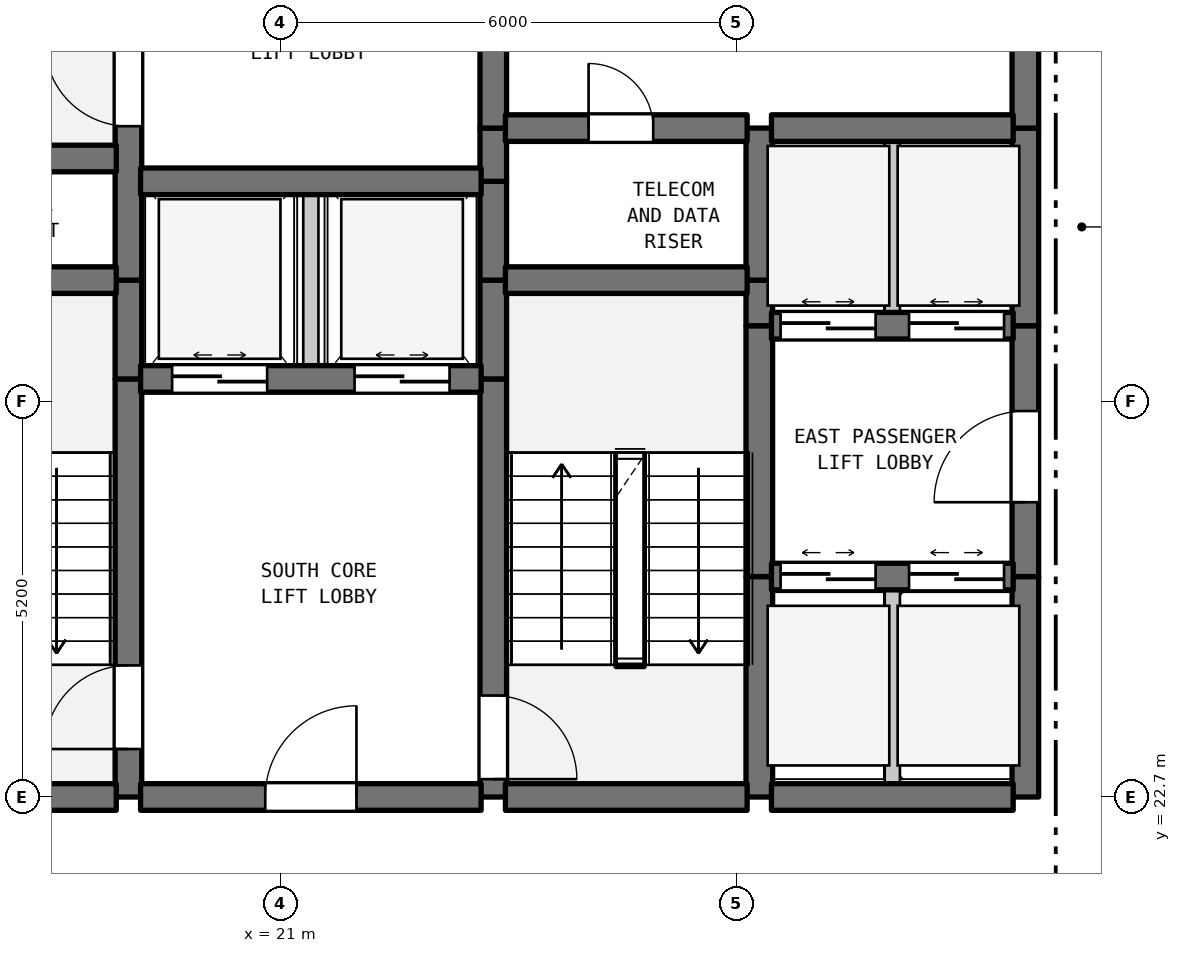
"""IFC4 building model, lengths in metres.
Left out: names, types, materials, properties, quantities, classifications, styles, units other than length and angle.
Written with IfcOpenShell. Run it as: python <this file> out.ifc"""

import sys

from ifc_helpers import new_model, si_unit, direction, frame, frame_2d, origin, place, context, subcontext, project, spatial, rectangle, extrude, element, fill, save


model = new_model("IFC4")
c1 = context("Model", 3, precision=1e-05, world=origin(), true_north=direction((0.0, 1.0)))
c2 = subcontext(c1, "Body", "Model", "MODEL_VIEW")
j1 = project(units=[si_unit("LENGTHUNIT", "METRE"), si_unit("PLANEANGLEUNIT", "RADIAN")], contexts=[c1])
p1 = place(None, origin())
s1 = spatial("IfcSite", under=j1, at=p1, CompositionType="ELEMENT")
p2 = place(p1, origin())
s2 = spatial("IfcBuilding", under=s1, at=p2, CompositionType="ELEMENT")
p3 = place(p2, frame((0.0, 0.0, 6.5)))
s3 = spatial("IfcBuildingStorey", under=s2, at=p3, CompositionType="ELEMENT", Elevation=6.5)
p4 = place(p3, frame((19.0, 22.7, 0.0), z_axis=(0.0, 0.0, 1.0), x_axis=(0.0, 1.0, 0.0)))
e1 = element("IfcWall", 1, at=p4, inside=s3, PredefinedType="SHEAR", context=c2, shape_type="SweptSolid", body=[
    extrude(rectangle(XDim=5.5, YDim=0.35, at=frame_2d((2.75, 0.0))), origin(), (0.0, 0.0, 1.0), 6.17),
])
p5 = place(p4, frame((0.631, 0.0, 0.0)))
e2 = element("IfcOpeningElement", 2, at=p5, cuts=e1, PredefinedType="OPENING", context=c2, shape_type="SweptSolid", body=[
    extrude(rectangle(XDim=1.1, YDim=2.15, at=frame_2d((0.55, 1.075))), frame((0.0, 0.185, 0.0), z_axis=(0.0, -1.0, 0.0), x_axis=(1.0, 0.0, 0.0)), (0.0, 0.0, 1.0), 0.37),
])
p6 = place(p3, frame((19.0, 28.2, 0.0), z_axis=(0.0, 0.0, 1.0), x_axis=(0.0, 1.0, 0.0)))
e3 = element("IfcWall", 3, at=p6, inside=s3, PredefinedType="SHEAR", context=c2, shape_type="SweptSolid", body=[
    extrude(rectangle(XDim=1.3, YDim=0.35, at=frame_2d((0.65, 0.0))), origin(), (0.0, 0.0, 1.0), 6.17),
])
p7 = place(p3, frame((19.0, 29.5, 0.0), z_axis=(0.0, 0.0, 1.0), x_axis=(0.0, 1.0, 0.0)))
e4 = element("IfcWall", 4, at=p7, inside=s3, PredefinedType="SHEAR", context=c2, shape_type="SweptSolid", body=[
    extrude(rectangle(XDim=5.5, YDim=0.35, at=frame_2d((2.75, 0.0))), origin(), (0.0, 0.0, 1.0), 6.17),
])
p8 = place(p7, frame((2.025, 0.0, 0.0)))
e5 = element("IfcOpeningElement", 5, at=p8, cuts=e4, PredefinedType="OPENING", context=c2, shape_type="SweptSolid", body=[
    extrude(rectangle(XDim=1.1, YDim=2.15, at=frame_2d((0.55, 1.075))), frame((0.0, 0.185, 0.0), z_axis=(0.0, -1.0, 0.0), x_axis=(1.0, 0.0, 0.0)), (0.0, 0.0, 1.0), 0.37),
])
p9 = place(p3, frame((21.4, 28.2, 0.0), z_axis=(0.0, 0.0, 1.0), x_axis=(0.0, 1.0, 0.0)))
e6 = element("IfcWall", 6, at=p9, inside=s3, PredefinedType="STANDARD", context=c2, shape_type="SweptSolid", body=[
    extrude(rectangle(XDim=2.6, YDim=0.2, at=frame_2d((1.3, 0.0))), origin(), (0.0, 0.0, 1.0), 6.17),
])
p10 = place(p3, frame((23.8, 22.7, 0.0), z_axis=(0.0, 0.0, 1.0), x_axis=(0.0, 1.0, 0.0)))
e7 = element("IfcWall", 7, at=p10, inside=s3, PredefinedType="SHEAR", context=c2, shape_type="SweptSolid", body=[
    extrude(rectangle(XDim=5.5, YDim=0.35, at=frame_2d((2.75, 0.0))), origin(), (0.0, 0.0, 1.0), 6.17),
])
p11 = place(p10, frame((0.235, 0.0, 0.0)))
e8 = element("IfcOpeningElement", 8, at=p11, cuts=e7, PredefinedType="OPENING", context=c2, shape_type="SweptSolid", body=[
    extrude(rectangle(XDim=1.1, YDim=2.15, at=frame_2d((0.55, 1.075))), frame((0.0, 0.185, 0.0), z_axis=(0.0, -1.0, 0.0), x_axis=(1.0, 0.0, 0.0)), (0.0, 0.0, 1.0), 0.37),
])
for number, where, z_axis, x_axis in (
    (9, (23.8, 28.2, 0.0), (0.0, 0.0, 1.0), (0.0, 1.0, 0.0)),
    (10, (23.8, 29.5, 0.0), (0.0, 0.0, 1.0), (0.0, 1.0, 0.0)),
):
    element("IfcWall", number, at=place(p3, frame(where, z_axis=z_axis, x_axis=x_axis)), inside=s3, PredefinedType="SHEAR", context=c2, shape_type="SweptSolid", body=[
        extrude(rectangle(XDim=1.3, YDim=0.35, at=frame_2d((0.65, 0.0))), origin(), (0.0, 0.0, 1.0), 6.17),
    ])
p12 = place(p3, frame((23.8, 30.8, 0.0), z_axis=(0.0, 0.0, 1.0), x_axis=(0.0, 1.0, 0.0)))
e11 = element("IfcWall", 11, at=p12, inside=s3, PredefinedType="SHEAR", context=c2, shape_type="SweptSolid", body=[
    extrude(rectangle(XDim=0.7, YDim=0.35, at=frame_2d((0.35, 0.0))), origin(), (0.0, 0.0, 1.0), 6.17),
])
p13 = place(p3, frame((23.8, 31.5, 0.0), z_axis=(0.0, 0.0, 1.0), x_axis=(0.0, 1.0, 0.0)))
e12 = element("IfcWall", 12, at=p13, inside=s3, PredefinedType="SHEAR", context=c2, shape_type="SweptSolid", body=[
    extrude(rectangle(XDim=3.5, YDim=0.35, at=frame_2d((1.75, 0.0))), origin(), (0.0, 0.0, 1.0), 6.17),
])
p14 = place(p13, frame((1.127, 0.0, 0.0)))
e13 = element("IfcOpeningElement", 13, at=p14, cuts=e12, PredefinedType="OPENING", context=c2, shape_type="SweptSolid", body=[
    extrude(rectangle(XDim=1.1, YDim=2.15, at=frame_2d((0.55, 1.075))), frame((0.0, 0.185, 0.0), z_axis=(0.0, -1.0, 0.0), x_axis=(1.0, 0.0, 0.0)), (0.0, 0.0, 1.0), 0.37),
])
p15 = place(p3, frame((27.3, 22.7, 0.0), z_axis=(0.0, 0.0, 1.0), x_axis=(0.0, 1.0, 0.0)))
e14 = element("IfcWall", 14, at=p15, inside=s3, PredefinedType="SHEAR", context=c2, shape_type="SweptSolid", body=[
    extrude(rectangle(XDim=2.9, YDim=0.35, at=frame_2d((1.45, 0.0))), origin(), (0.0, 0.0, 1.0), 6.17),
])
p16 = place(p3, frame((27.3, 25.6, 0.0), z_axis=(0.0, 0.0, 1.0), x_axis=(0.0, 1.0, 0.0)))
e15 = element("IfcWall", 15, at=p16, inside=s3, PredefinedType="SHEAR", context=c2, shape_type="SweptSolid", body=[
    extrude(rectangle(XDim=3.3, YDim=0.35, at=frame_2d((1.65, 0.0))), origin(), (0.0, 0.0, 1.0), 6.17),
])
p17 = place(p3, frame((27.3, 28.9, 0.0), z_axis=(0.0, 0.0, 1.0), x_axis=(0.0, 1.0, 0.0)))
e16 = element("IfcWall", 16, at=p17, inside=s3, PredefinedType="SHEAR", context=c2, shape_type="SweptSolid", body=[
    extrude(rectangle(XDim=0.6, YDim=0.35, at=frame_2d((0.3, 0.0))), origin(), (0.0, 0.0, 1.0), 6.17),
])
p18 = place(p3, frame((27.3, 29.5, 0.0), z_axis=(0.0, 0.0, 1.0), x_axis=(0.0, 1.0, 0.0)))
e17 = element("IfcWall", 17, at=p18, inside=s3, PredefinedType="SHEAR", context=c2, shape_type="SweptSolid", body=[
    extrude(rectangle(XDim=2.0, YDim=0.35, at=frame_2d((1.0, 0.0))), origin(), (0.0, 0.0, 1.0), 6.17),
])
p19 = place(p3, frame((29.05, 22.7, 0.0), z_axis=(0.0, 0.0, 1.0), x_axis=(0.0, 1.0, 0.0)))
e18 = element("IfcWall", 18, at=p19, inside=s3, PredefinedType="STANDARD", context=c2, shape_type="SweptSolid", body=[
    extrude(rectangle(XDim=2.9, YDim=0.2, at=frame_2d((1.45, 0.0))), origin(), (0.0, 0.0, 1.0), 6.17),
])
p20 = place(p3, frame((29.05, 28.9, 0.0), z_axis=(0.0, 0.0, 1.0), x_axis=(0.0, 1.0, 0.0)))
e19 = element("IfcWall", 19, at=p20, inside=s3, PredefinedType="STANDARD", context=c2, shape_type="SweptSolid", body=[
    extrude(rectangle(XDim=2.6, YDim=0.2, at=frame_2d((1.3, 0.0))), origin(), (0.0, 0.0, 1.0), 6.17),
])
p21 = place(p3, frame((30.8, 22.7, 0.0), z_axis=(0.0, 0.0, 1.0), x_axis=(0.0, 1.0, 0.0)))
e20 = element("IfcWall", 20, at=p21, inside=s3, PredefinedType="SHEAR", context=c2, shape_type="SweptSolid", body=[
    extrude(rectangle(XDim=2.9, YDim=0.35, at=frame_2d((1.45, 0.0))), origin(), (0.0, 0.0, 1.0), 6.17),
])
p22 = place(p3, frame((30.8, 25.6, 0.0), z_axis=(0.0, 0.0, 1.0), x_axis=(0.0, 1.0, 0.0)))
e21 = element("IfcWall", 21, at=p22, inside=s3, PredefinedType="SHEAR", context=c2, shape_type="SweptSolid", body=[
    extrude(rectangle(XDim=3.3, YDim=0.35, at=frame_2d((1.65, 0.0))), origin(), (0.0, 0.0, 1.0), 6.17),
])
p23 = place(p22, frame((0.978, 0.0, 0.0)))
e22 = element("IfcOpeningElement", 22, at=p23, cuts=e21, PredefinedType="OPENING", context=c2, shape_type="SweptSolid", body=[
    extrude(rectangle(XDim=1.2, YDim=2.2, at=frame_2d((0.6, 1.1))), frame((0.0, 0.185, 0.0), z_axis=(0.0, -1.0, 0.0), x_axis=(1.0, 0.0, 0.0)), (0.0, 0.0, 1.0), 0.37),
])
p24 = place(p3, frame((30.8, 28.9, 0.0), z_axis=(0.0, 0.0, 1.0), x_axis=(0.0, 1.0, 0.0)))
e23 = element("IfcWall", 23, at=p24, inside=s3, PredefinedType="SHEAR", context=c2, shape_type="SweptSolid", body=[
    extrude(rectangle(XDim=2.6, YDim=0.35, at=frame_2d((1.3, 0.0))), origin(), (0.0, 0.0, 1.0), 6.17),
])
p25 = place(p3, frame((30.8, 31.5, 0.0), z_axis=(0.0, 0.0, 1.0), x_axis=(0.0, 1.0, 0.0)))
e24 = element("IfcWall", 24, at=p25, inside=s3, PredefinedType="SHEAR", context=c2, shape_type="SweptSolid", body=[
    extrude(rectangle(XDim=3.5, YDim=0.35, at=frame_2d((1.75, 0.0))), origin(), (0.0, 0.0, 1.0), 6.17),
])
p26 = place(p25, frame((1.15, 0.0, 0.0)))
e25 = element("IfcOpeningElement", 25, at=p26, cuts=e24, PredefinedType="OPENING", context=c2, shape_type="SweptSolid", body=[
    extrude(rectangle(XDim=1.2, YDim=2.2, at=frame_2d((0.6, 1.1))), frame((0.0, 0.185, 0.0), z_axis=(0.0, -1.0, 0.0), x_axis=(1.0, 0.0, 0.0)), (0.0, 0.0, 1.0), 0.37),
])
p27 = place(p3, frame((15.16, 22.7, 0.0), z_axis=(0.0, 0.0, 1.0), x_axis=(1.0, 0.0, 0.0)))
e26 = element("IfcWall", 26, at=p27, inside=s3, PredefinedType="SHEAR", context=c2, shape_type="SweptSolid", body=[
    extrude(rectangle(XDim=3.68, YDim=0.35, at=frame_2d((1.84, 0.0))), origin(), (0.0, 0.0, 1.0), 6.17),
])
p28 = place(p3, frame((19.16, 22.7, 0.0), z_axis=(0.0, 0.0, 1.0), x_axis=(1.0, 0.0, 0.0)))
e27 = element("IfcWall", 27, at=p28, inside=s3, PredefinedType="SHEAR", context=c2, shape_type="SweptSolid", body=[
    extrude(rectangle(XDim=4.48, YDim=0.35, at=frame_2d((2.24, 0.0))), origin(), (0.0, 0.0, 1.0), 6.17),
])
p29 = place(p28, frame((1.64, 0.0, 0.0)))
e28 = element("IfcOpeningElement", 28, at=p29, cuts=e27, PredefinedType="OPENING", context=c2, shape_type="SweptSolid", body=[
    extrude(rectangle(XDim=1.2, YDim=2.2, at=frame_2d((0.6, 1.1))), frame((0.0, 0.185, 0.0), z_axis=(0.0, -1.0, 0.0), x_axis=(1.0, 0.0, 0.0)), (0.0, 0.0, 1.0), 0.37),
])
for number, where, z_axis, x_axis in (
    (29, (23.96, 22.7, 0.0), (0.0, 0.0, 1.0), (1.0, 0.0, 0.0)),
    (30, (27.46, 22.7, 0.0), (0.0, 0.0, 1.0), (1.0, 0.0, 0.0)),
):
    element("IfcWall", number, at=place(p3, frame(where, z_axis=z_axis, x_axis=x_axis)), inside=s3, PredefinedType="SHEAR", context=c2, shape_type="SweptSolid", body=[
        extrude(rectangle(XDim=3.18, YDim=0.35, at=frame_2d((1.59, 0.0))), origin(), (0.0, 0.0, 1.0), 6.17),
    ])
p30 = place(p3, frame((27.46, 25.6, 0.0), z_axis=(0.0, 0.0, 1.0), x_axis=(1.0, 0.0, 0.0)))
e31 = element("IfcWall", 31, at=p30, inside=s3, PredefinedType="SHEAR", context=c2, shape_type="SweptSolid", body=[
    extrude(rectangle(XDim=3.18, YDim=0.35, at=frame_2d((1.59, 0.0))), origin(), (0.0, 0.0, 1.0), 6.17),
])
p31 = place(p30, frame((0.12, 0.0, 0.0)))
e32 = element("IfcOpeningElement", 32, at=p31, cuts=e31, PredefinedType="OPENING", context=c2, shape_type="SweptSolid", body=[
    extrude(rectangle(XDim=1.25, YDim=2.2, at=frame_2d((0.625, 1.1))), frame((0.0, 0.185, 0.0), z_axis=(0.0, -1.0, 0.0), x_axis=(1.0, 0.0, 0.0)), (0.0, 0.0, 1.0), 0.37),
])
p32 = place(p30, frame((1.81, 0.0, 0.0)))
e33 = element("IfcOpeningElement", 33, at=p32, cuts=e31, PredefinedType="OPENING", context=c2, shape_type="SweptSolid", body=[
    extrude(rectangle(XDim=1.25, YDim=2.2, at=frame_2d((0.625, 1.1))), frame((0.0, 0.185, 0.0), z_axis=(0.0, -1.0, 0.0), x_axis=(1.0, 0.0, 0.0)), (0.0, 0.0, 1.0), 0.37),
])
p33 = place(p3, frame((19.16, 28.2, 0.0), z_axis=(0.0, 0.0, 1.0), x_axis=(1.0, 0.0, 0.0)))
e34 = element("IfcWall", 34, at=p33, inside=s3, PredefinedType="SHEAR", context=c2, shape_type="SweptSolid", body=[
    extrude(rectangle(XDim=4.48, YDim=0.35, at=frame_2d((2.24, 0.0))), origin(), (0.0, 0.0, 1.0), 6.17),
])
p34 = place(p33, frame((0.415, 0.0, 0.0)))
e35 = element("IfcOpeningElement", 35, at=p34, cuts=e34, PredefinedType="OPENING", context=c2, shape_type="SweptSolid", body=[
    extrude(rectangle(XDim=1.25, YDim=2.2, at=frame_2d((0.625, 1.1))), frame((0.0, 0.185, 0.0), z_axis=(0.0, -1.0, 0.0), x_axis=(1.0, 0.0, 0.0)), (0.0, 0.0, 1.0), 0.37),
])
p35 = place(p33, frame((2.815, 0.0, 0.0)))
e36 = element("IfcOpeningElement", 36, at=p35, cuts=e34, PredefinedType="OPENING", context=c2, shape_type="SweptSolid", body=[
    extrude(rectangle(XDim=1.25, YDim=2.2, at=frame_2d((0.625, 1.1))), frame((0.0, 0.185, 0.0), z_axis=(0.0, -1.0, 0.0), x_axis=(1.0, 0.0, 0.0)), (0.0, 0.0, 1.0), 0.37),
])
p36 = place(p3, frame((27.46, 28.9, 0.0), z_axis=(0.0, 0.0, 1.0), x_axis=(1.0, 0.0, 0.0)))
e37 = element("IfcWall", 37, at=p36, inside=s3, PredefinedType="SHEAR", context=c2, shape_type="SweptSolid", body=[
    extrude(rectangle(XDim=3.18, YDim=0.35, at=frame_2d((1.59, 0.0))), origin(), (0.0, 0.0, 1.0), 6.17),
])
p37 = place(p36, frame((0.12, 0.0, 0.0)))
e38 = element("IfcOpeningElement", 38, at=p37, cuts=e37, PredefinedType="OPENING", context=c2, shape_type="SweptSolid", body=[
    extrude(rectangle(XDim=1.25, YDim=2.2, at=frame_2d((0.625, 1.1))), frame((0.0, 0.185, 0.0), z_axis=(0.0, -1.0, 0.0), x_axis=(1.0, 0.0, 0.0)), (0.0, 0.0, 1.0), 0.37),
])
p38 = place(p36, frame((1.81, 0.0, 0.0)))
e39 = element("IfcOpeningElement", 39, at=p38, cuts=e37, PredefinedType="OPENING", context=c2, shape_type="SweptSolid", body=[
    extrude(rectangle(XDim=1.25, YDim=2.2, at=frame_2d((0.625, 1.1))), frame((0.0, 0.185, 0.0), z_axis=(0.0, -1.0, 0.0), x_axis=(1.0, 0.0, 0.0)), (0.0, 0.0, 1.0), 0.37),
])
p39 = place(p3, frame((15.16, 29.5, 0.0), z_axis=(0.0, 0.0, 1.0), x_axis=(1.0, 0.0, 0.0)))
e40 = element("IfcWall", 40, at=p39, inside=s3, PredefinedType="SHEAR", context=c2, shape_type="SweptSolid", body=[
    extrude(rectangle(XDim=3.68, YDim=0.35, at=frame_2d((1.84, 0.0))), origin(), (0.0, 0.0, 1.0), 6.17),
])
p40 = place(p3, frame((23.96, 29.5, 0.0), z_axis=(0.0, 0.0, 1.0), x_axis=(1.0, 0.0, 0.0)))
e41 = element("IfcWall", 41, at=p40, inside=s3, PredefinedType="SHEAR", context=c2, shape_type="SweptSolid", body=[
    extrude(rectangle(XDim=3.18, YDim=0.35, at=frame_2d((1.59, 0.0))), origin(), (0.0, 0.0, 1.0), 6.17),
])
p41 = place(p3, frame((19.16, 30.8, 0.0), z_axis=(0.0, 0.0, 1.0), x_axis=(1.0, 0.0, 0.0)))
e42 = element("IfcWall", 42, at=p41, inside=s3, PredefinedType="SHEAR", context=c2, shape_type="SweptSolid", body=[
    extrude(rectangle(XDim=4.48, YDim=0.35, at=frame_2d((2.24, 0.0))), origin(), (0.0, 0.0, 1.0), 6.17),
])
p42 = place(p3, frame((15.16, 31.1, 0.0), z_axis=(0.0, 0.0, 1.0), x_axis=(1.0, 0.0, 0.0)))
e43 = element("IfcWall", 43, at=p42, inside=s3, PredefinedType="SHEAR", context=c2, shape_type="SweptSolid", body=[
    extrude(rectangle(XDim=3.68, YDim=0.35, at=frame_2d((1.84, 0.0))), origin(), (0.0, 0.0, 1.0), 6.17),
])
p43 = place(p3, frame((23.96, 31.5, 0.0), z_axis=(0.0, 0.0, 1.0), x_axis=(1.0, 0.0, 0.0)))
e44 = element("IfcWall", 44, at=p43, inside=s3, PredefinedType="SHEAR", context=c2, shape_type="SweptSolid", body=[
    extrude(rectangle(XDim=3.18, YDim=0.35, at=frame_2d((1.59, 0.0))), origin(), (0.0, 0.0, 1.0), 6.17),
])
p44 = place(p43, frame((1.094, 0.0, 0.0)))
e45 = element("IfcOpeningElement", 45, at=p44, cuts=e44, PredefinedType="OPENING", context=c2, shape_type="SweptSolid", body=[
    extrude(rectangle(XDim=0.85, YDim=2.1, at=frame_2d((0.425, 1.05))), frame((0.0, 0.185, 0.0), z_axis=(0.0, -1.0, 0.0), x_axis=(1.0, 0.0, 0.0)), (0.0, 0.0, 1.0), 0.37),
])
p45 = place(p3, frame((27.46, 31.5, 0.0), z_axis=(0.0, 0.0, 1.0), x_axis=(1.0, 0.0, 0.0)))
e46 = element("IfcWall", 46, at=p45, inside=s3, PredefinedType="SHEAR", context=c2, shape_type="SweptSolid", body=[
    extrude(rectangle(XDim=3.18, YDim=0.35, at=frame_2d((1.59, 0.0))), origin(), (0.0, 0.0, 1.0), 6.17),
])
p46 = place(p5, origin())
e47 = element("IfcDoor", 47, at=p46, inside=s3, OperationType="SINGLE_SWING_LEFT", PredefinedType="DOOR", context=c2, shape_type="SweptSolid", body=[
    extrude(rectangle(XDim=1.1, YDim=2.15, at=frame_2d((0.55, 1.075))), frame((0.0, 0.025, 0.0), z_axis=(0.0, -1.0, 0.0), x_axis=(1.0, 0.0, 0.0)), (0.0, 0.0, 1.0), 0.05),
])
fill(e2, e47)
p47 = place(p8, origin())
e48 = element("IfcDoor", 48, at=p47, inside=s3, OperationType="SINGLE_SWING_RIGHT", PredefinedType="DOOR", context=c2, shape_type="SweptSolid", body=[
    extrude(rectangle(XDim=1.1, YDim=2.15, at=frame_2d((0.55, 1.075))), frame((0.0, 0.025, 0.0), z_axis=(0.0, -1.0, 0.0), x_axis=(1.0, 0.0, 0.0)), (0.0, 0.0, 1.0), 0.05),
])
fill(e5, e48)
p48 = place(p11, frame((1.1, 0.0, 0.0), z_axis=(0.0, 0.0, 1.0), x_axis=(-1.0, 0.0, 0.0)))
e49 = element("IfcDoor", 49, at=p48, inside=s3, OperationType="SINGLE_SWING_LEFT", PredefinedType="DOOR", context=c2, shape_type="SweptSolid", body=[
    extrude(rectangle(XDim=1.1, YDim=2.15, at=frame_2d((0.55, 1.075))), frame((0.0, 0.025, 0.0), z_axis=(0.0, -1.0, 0.0), x_axis=(1.0, 0.0, 0.0)), (0.0, 0.0, 1.0), 0.05),
])
fill(e8, e49)
p49 = place(p23, origin())
e50 = element("IfcDoor", 50, at=p49, inside=s3, OperationType="SINGLE_SWING_LEFT", PredefinedType="DOOR", context=c2, shape_type="SweptSolid", body=[
    extrude(rectangle(XDim=1.2, YDim=2.2, at=frame_2d((0.6, 1.1))), frame((0.0, 0.025, 0.0), z_axis=(0.0, -1.0, 0.0), x_axis=(1.0, 0.0, 0.0)), (0.0, 0.0, 1.0), 0.05),
])
fill(e22, e50)
p50 = place(p29, origin())
e51 = element("IfcDoor", 51, at=p50, inside=s3, OperationType="SINGLE_SWING_RIGHT", PredefinedType="DOOR", context=c2, shape_type="SweptSolid", body=[
    extrude(rectangle(XDim=1.2, YDim=2.2, at=frame_2d((0.6, 1.1))), frame((0.0, 0.025, 0.0), z_axis=(0.0, -1.0, 0.0), x_axis=(1.0, 0.0, 0.0)), (0.0, 0.0, 1.0), 0.05),
])
fill(e28, e51)
p51 = place(p31, origin())
e52 = element("IfcDoor", 52, at=p51, inside=s3, OperationType="DOUBLE_DOOR_SLIDING", PredefinedType="DOOR", context=c2, shape_type="SweptSolid", body=[
    extrude(rectangle(XDim=1.25, YDim=2.2, at=frame_2d((0.625, 1.1))), frame((0.0, 0.025, 0.0), z_axis=(0.0, -1.0, 0.0), x_axis=(1.0, 0.0, 0.0)), (0.0, 0.0, 1.0), 0.05),
])
fill(e32, e52)
p52 = place(p32, origin())
e53 = element("IfcDoor", 53, at=p52, inside=s3, OperationType="DOUBLE_DOOR_SLIDING", PredefinedType="DOOR", context=c2, shape_type="SweptSolid", body=[
    extrude(rectangle(XDim=1.25, YDim=2.2, at=frame_2d((0.625, 1.1))), frame((0.0, 0.025, 0.0), z_axis=(0.0, -1.0, 0.0), x_axis=(1.0, 0.0, 0.0)), (0.0, 0.0, 1.0), 0.05),
])
fill(e33, e53)
p53 = place(p34, origin())
e54 = element("IfcDoor", 54, at=p53, inside=s3, OperationType="DOUBLE_DOOR_SLIDING", PredefinedType="DOOR", context=c2, shape_type="SweptSolid", body=[
    extrude(rectangle(XDim=1.25, YDim=2.2, at=frame_2d((0.625, 1.1))), frame((0.0, 0.025, 0.0), z_axis=(0.0, -1.0, 0.0), x_axis=(1.0, 0.0, 0.0)), (0.0, 0.0, 1.0), 0.05),
])
fill(e35, e54)
p54 = place(p35, origin())
e55 = element("IfcDoor", 55, at=p54, inside=s3, OperationType="DOUBLE_DOOR_SLIDING", PredefinedType="DOOR", context=c2, shape_type="SweptSolid", body=[
    extrude(rectangle(XDim=1.25, YDim=2.2, at=frame_2d((0.625, 1.1))), frame((0.0, 0.025, 0.0), z_axis=(0.0, -1.0, 0.0), x_axis=(1.0, 0.0, 0.0)), (0.0, 0.0, 1.0), 0.05),
])
fill(e36, e55)
p55 = place(p37, origin())
e56 = element("IfcDoor", 56, at=p55, inside=s3, OperationType="DOUBLE_DOOR_SLIDING", PredefinedType="DOOR", context=c2, shape_type="SweptSolid", body=[
    extrude(rectangle(XDim=1.25, YDim=2.2, at=frame_2d((0.625, 1.1))), frame((0.0, 0.025, 0.0), z_axis=(0.0, -1.0, 0.0), x_axis=(1.0, 0.0, 0.0)), (0.0, 0.0, 1.0), 0.05),
])
fill(e38, e56)
p56 = place(p38, origin())
e57 = element("IfcDoor", 57, at=p56, inside=s3, OperationType="DOUBLE_DOOR_SLIDING", PredefinedType="DOOR", context=c2, shape_type="SweptSolid", body=[
    extrude(rectangle(XDim=1.25, YDim=2.2, at=frame_2d((0.625, 1.1))), frame((0.0, 0.025, 0.0), z_axis=(0.0, -1.0, 0.0), x_axis=(1.0, 0.0, 0.0)), (0.0, 0.0, 1.0), 0.05),
])
fill(e39, e57)
p57 = place(p44, origin())
e58 = element("IfcDoor", 58, at=p57, inside=s3, OperationType="SINGLE_SWING_LEFT", PredefinedType="DOOR", context=c2, shape_type="SweptSolid", body=[
    extrude(rectangle(XDim=0.85, YDim=2.1, at=frame_2d((0.425, 1.05))), frame((0.0, 0.025, 0.0), z_axis=(0.0, -1.0, 0.0), x_axis=(1.0, 0.0, 0.0)), (0.0, 0.0, 1.0), 0.05),
])
fill(e45, e58)
save(model, sys.argv[1])
